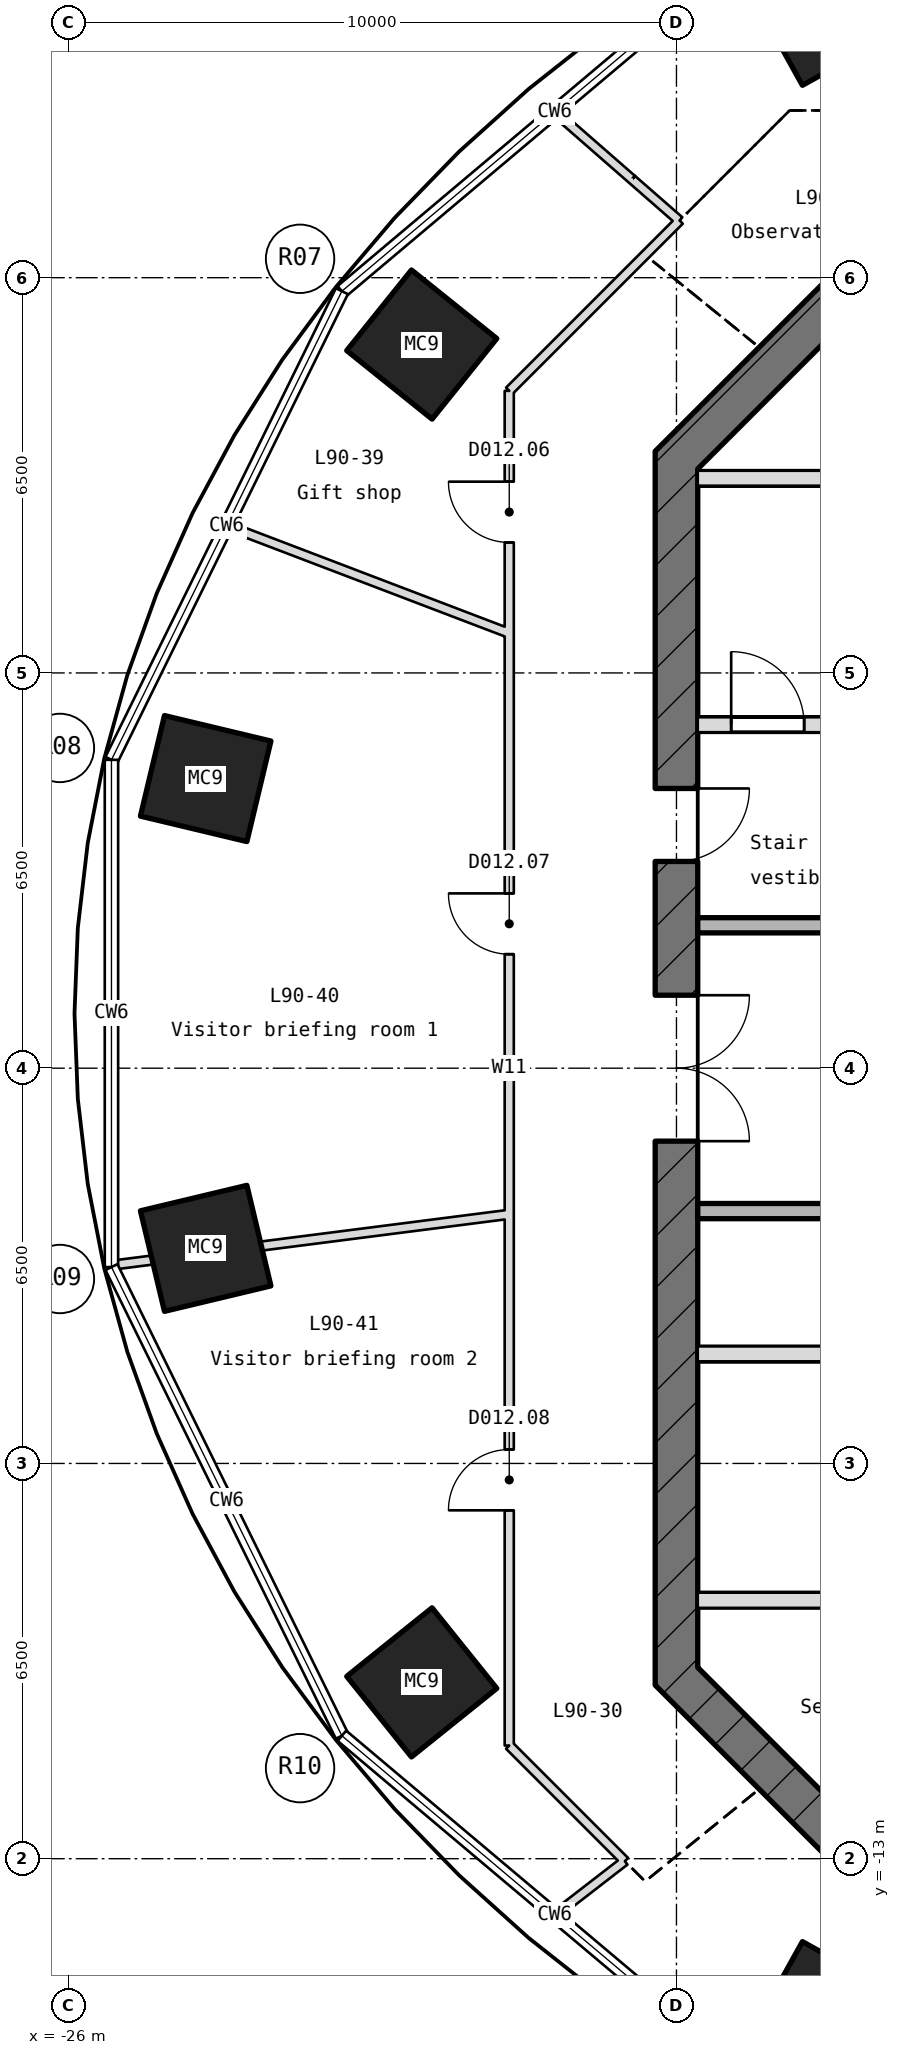
"""IFC4 building model, lengths in metres.
Left out: names, types, materials, properties, quantities, classifications, styles, units other than length and angle.
Written with IfcOpenShell. Run it as: python <this file> out.ifc"""

import sys

from ifc_helpers import new_model, si_unit, direction, frame, frame_2d, origin, origin_2d, place, context, subcontext, project, spatial, rectangle, hollow_rectangle, extrude, element, fill, save


model = new_model("IFC4")
c1 = context("Model", 3, precision=1e-05, world=origin(), true_north=direction((0.0, 1.0)))
c2 = subcontext(c1, "Body", "Model", "MODEL_VIEW")
j1 = project(units=[si_unit("LENGTHUNIT", "METRE"), si_unit("PLANEANGLEUNIT", "RADIAN")], contexts=[c1])
p1 = place(None, origin())
s1 = spatial("IfcSite", under=j1, at=p1, CompositionType="ELEMENT")
p2 = place(p1, origin())
s2 = spatial("IfcBuilding", under=s1, at=p2, CompositionType="ELEMENT")
p3 = place(p2, frame((0.0, 0.0, 396.55)))
s3 = spatial("IfcBuildingStorey", under=s2, at=p3, CompositionType="ELEMENT", Elevation=396.55)
for number, where, z_axis, x_axis in (
    (1, (-13.623, 17.363, -0.25), (0.0, 0.0, 1.0), (0.874, 0.486, 0.0)),
    (2, (-20.189, 11.9, -0.25), (0.0, 0.0, 1.0), (0.626, 0.78, 0.0)),
    (3, (-23.743, 4.763, -0.25), (0.0, 0.0, 1.0), (0.233, 0.973, 0.0)),
    (4, (-23.743, -2.963, -0.25), (0.0, 0.0, 1.0), (-0.233, 0.973, 0.0)),
    (5, (-20.189, -10.1, -0.25), (0.0, 0.0, 1.0), (-0.626, 0.78, 0.0)),
    (6, (-13.623, -15.563, -0.25), (0.0, 0.0, 1.0), (-0.874, 0.486, 0.0)),
):
    element("IfcColumn", number, at=place(p3, frame(where, z_axis=z_axis, x_axis=x_axis)), inside=s3, PredefinedType="COLUMN", context=c2, shape_type="SweptSolid", body=[
        extrude(hollow_rectangle(XDim=1.7, YDim=1.8, WallThickness=0.05, at=origin_2d()), origin(), (0.0, 0.0, 1.0), 5.4),
    ])
p4 = place(p3, frame((-12.897, 13.103, -0.25), z_axis=(0.0, 0.0, 1.0), x_axis=(-0.707106781187, -0.707106781187, 0.0)))
e7 = element("IfcWall", 7, at=p4, inside=s3, PredefinedType="SHEAR", context=c2, shape_type="SweptSolid", body=[
    extrude(rectangle(XDim=4.533, YDim=0.7, at=frame_2d((2.266, 0.0))), origin(), (0.0, 0.0, 1.0), 5.4),
])
p5 = place(p3, frame((-16.0, 10.145, -0.25), z_axis=(0.0, 0.0, 1.0), x_axis=(0.0, -1.0, 0.0)))
e8 = element("IfcWall", 8, at=p5, inside=s3, PredefinedType="SHEAR", context=c2, shape_type="SweptSolid", body=[
    extrude(rectangle(XDim=20.29, YDim=0.7, at=frame_2d((10.145, 0.0))), origin(), (0.0, 0.0, 1.0), 5.4),
])
p6 = place(p5, frame((8.945, 0.0, 0.25)))
e9 = element("IfcOpeningElement", 9, at=p6, cuts=e8, PredefinedType="OPENING", context=c2, shape_type="SweptSolid", body=[
    extrude(rectangle(XDim=2.4, YDim=2.1, at=frame_2d((1.2, 1.05))), frame((0.0, 0.36, 0.0), z_axis=(0.0, -1.0, 0.0), x_axis=(1.0, 0.0, 0.0)), (0.0, 0.0, 1.0), 0.72),
])
p7 = place(p5, frame((5.545, 0.0, 0.25)))
e10 = element("IfcOpeningElement", 10, at=p7, cuts=e8, PredefinedType="OPENING", context=c2, shape_type="SweptSolid", body=[
    extrude(rectangle(XDim=1.2, YDim=2.1, at=frame_2d((0.6, 1.05))), frame((0.0, 0.36, 0.0), z_axis=(0.0, -1.0, 0.0), x_axis=(1.0, 0.0, 0.0)), (0.0, 0.0, 1.0), 0.72),
])
p8 = place(p3, frame((-16.103, -9.897, -0.25), z_axis=(0.0, 0.0, 1.0), x_axis=(0.707106781187, -0.707106781187, 0.0)))
e11 = element("IfcWall", 11, at=p8, inside=s3, PredefinedType="SHEAR", context=c2, shape_type="SweptSolid", body=[
    extrude(rectangle(XDim=4.533, YDim=0.7, at=frame_2d((2.266, 0.0))), origin(), (0.0, 0.0, 1.0), 5.4),
])
p9 = place(p3, frame((-15.65, -8.75, -0.25), z_axis=(0.0, 0.0, 1.0), x_axis=(1.0, 0.0, 0.0)))
e12 = element("IfcWall", 12, at=p9, inside=s3, PredefinedType="SHEAR", context=c2, shape_type="SweptSolid", body=[
    extrude(rectangle(XDim=7.1, YDim=0.25, at=frame_2d((3.55, 0.0))), origin(), (0.0, 0.0, 1.0), 5.4),
])
p10 = place(p9, frame((5.6, 0.0, 0.25)))
e13 = element("IfcOpeningElement", 13, at=p10, cuts=e12, PredefinedType="OPENING", context=c2, shape_type="SweptSolid", body=[
    extrude(rectangle(XDim=1.2, YDim=2.1, at=frame_2d((0.6, 1.05))), frame((0.0, 0.135, 0.0), z_axis=(0.0, -1.0, 0.0), x_axis=(1.0, 0.0, 0.0)), (0.0, 0.0, 1.0), 0.27),
])
p11 = place(p3, frame((-15.65, -4.7, -0.25), z_axis=(0.0, 0.0, 1.0), x_axis=(1.0, 0.0, 0.0)))
e14 = element("IfcWall", 14, at=p11, inside=s3, PredefinedType="SHEAR", context=c2, shape_type="SweptSolid", body=[
    extrude(rectangle(XDim=7.1, YDim=0.25, at=frame_2d((3.55, 0.0))), origin(), (0.0, 0.0, 1.0), 5.4),
])
for number, where, z_axis, x_axis in (
    (15, (-15.65, -2.35, 0.0), (0.0, 0.0, 1.0), (1.0, 0.0, 0.0)),
    (16, (-15.65, 2.35, 0.0), (0.0, 0.0, 1.0), (1.0, 0.0, 0.0)),
):
    element("IfcWall", number, at=place(p3, frame(where, z_axis=z_axis, x_axis=x_axis)), inside=s3, PredefinedType="STANDARD", context=c2, shape_type="SweptSolid", body=[
        extrude(rectangle(XDim=7.25, YDim=0.25, at=frame_2d((3.625, 0.0))), origin(), (0.0, 0.0, 1.0), 5.15),
    ])
p12 = place(p3, frame((-15.65, 5.65, -0.25), z_axis=(0.0, 0.0, 1.0), x_axis=(1.0, 0.0, 0.0)))
e17 = element("IfcWall", 17, at=p12, inside=s3, PredefinedType="SHEAR", context=c2, shape_type="SweptSolid", body=[
    extrude(rectangle(XDim=7.1, YDim=0.25, at=frame_2d((3.55, 0.0))), origin(), (0.0, 0.0, 1.0), 5.4),
])
p13 = place(p12, frame((0.55, 0.0, 0.25)))
e18 = element("IfcOpeningElement", 18, at=p13, cuts=e17, PredefinedType="OPENING", context=c2, shape_type="SweptSolid", body=[
    extrude(rectangle(XDim=1.2, YDim=2.1, at=frame_2d((0.6, 1.05))), frame((0.0, 0.135, 0.0), z_axis=(0.0, -1.0, 0.0), x_axis=(1.0, 0.0, 0.0)), (0.0, 0.0, 1.0), 0.27),
])
p14 = place(p3, frame((-15.65, 9.7, -0.25), z_axis=(0.0, 0.0, 1.0), x_axis=(1.0, 0.0, 0.0)))
e19 = element("IfcWall", 19, at=p14, inside=s3, PredefinedType="SHEAR", context=c2, shape_type="SweptSolid", body=[
    extrude(rectangle(XDim=7.1, YDim=0.25, at=frame_2d((3.55, 0.0))), origin(), (0.0, 0.0, 1.0), 5.4),
])
p15 = place(p3, frame((-25.272, -3.238, 0.0), z_axis=(0.0, 0.0, 1.0), x_axis=(0.991889327686, 0.127104530296, 0.0)))
e20 = element("IfcWall", 20, at=p15, inside=s3, PredefinedType="PARTITIONING", context=c2, shape_type="SweptSolid", body=[
    extrude(rectangle(XDim=1.957, YDim=0.15, at=frame_2d((0.979, 0.0))), origin(), (0.0, 0.0, 1.0), 5.15),
])
p16 = place(p3, frame((-23.331, -2.99, 0.0), z_axis=(0.0, 0.0, 1.0), x_axis=(0.991891748856, 0.12708563472, 0.0)))
e21 = element("IfcWall", 21, at=p16, inside=s3, PredefinedType="PARTITIONING", context=c2, shape_type="SweptSolid", body=[
    extrude(rectangle(XDim=4.618, YDim=0.15, at=frame_2d((2.309, 0.0))), origin(), (0.0, 0.0, 1.0), 4.683),
])
p17 = place(p3, frame((-17.985, -13.915, 0.0), z_axis=(0.0, 0.0, 1.0), x_axis=(0.790899150715, 0.611946511877, 0.0)))
e22 = element("IfcWall", 22, at=p17, inside=s3, PredefinedType="PARTITIONING", context=c2, shape_type="SweptSolid", body=[
    extrude(rectangle(XDim=1.434, YDim=0.15, at=frame_2d((0.717, 0.0))), origin(), (0.0, 0.0, 1.0), 5.15),
])
p18 = place(p3, frame((-18.75, 11.139, 0.0), z_axis=(0.0, 0.0, 1.0), x_axis=(0.707106781187, 0.707106781187, 0.0)))
e23 = element("IfcWall", 23, at=p18, inside=s3, PredefinedType="PARTITIONING", context=c2, shape_type="SweptSolid", body=[
    extrude(rectangle(XDim=3.962, YDim=0.15, at=frame_2d((1.981, 0.0))), origin(), (0.0, 0.0, 1.0), 5.15),
])
p19 = place(p3, frame((-18.75, -11.139, 0.0), z_axis=(0.0, 0.0, 1.0), x_axis=(0.0, 1.0, 0.0)))
e24 = element("IfcWall", 24, at=p19, inside=s3, PredefinedType="PARTITIONING", context=c2, shape_type="SweptSolid", body=[
    extrude(rectangle(XDim=22.278, YDim=0.15, at=frame_2d((11.139, 0.0))), origin(), (0.0, 0.0, 1.0), 5.15),
])
p20 = place(p19, frame((19.785, 0.0, 0.0)))
e25 = element("IfcOpeningElement", 25, at=p20, cuts=e24, PredefinedType="OPENING", context=c2, shape_type="SweptSolid", body=[
    extrude(rectangle(XDim=1.0, YDim=2.1, at=frame_2d((0.5, 1.05))), frame((0.0, 0.085, 0.0), z_axis=(0.0, -1.0, 0.0), x_axis=(1.0, 0.0, 0.0)), (0.0, 0.0, 1.0), 0.17),
])
p21 = place(p19, frame((13.014, 0.0, 0.0)))
e26 = element("IfcOpeningElement", 26, at=p21, cuts=e24, PredefinedType="OPENING", context=c2, shape_type="SweptSolid", body=[
    extrude(rectangle(XDim=1.0, YDim=2.1, at=frame_2d((0.5, 1.05))), frame((0.0, 0.085, 0.0), z_axis=(0.0, -1.0, 0.0), x_axis=(1.0, 0.0, 0.0)), (0.0, 0.0, 1.0), 0.17),
])
p22 = place(p19, frame((3.868, 0.0, 0.0)))
e27 = element("IfcOpeningElement", 27, at=p22, cuts=e24, PredefinedType="OPENING", context=c2, shape_type="SweptSolid", body=[
    extrude(rectangle(XDim=1.0, YDim=2.1, at=frame_2d((0.5, 1.05))), frame((0.0, 0.085, 0.0), z_axis=(0.0, -1.0, 0.0), x_axis=(1.0, 0.0, 0.0)), (0.0, 0.0, 1.0), 0.17),
])
p23 = place(p3, frame((-16.848, -13.041, 0.0), z_axis=(0.0, 0.0, 1.0), x_axis=(-0.707106781187, 0.707106781187, 0.0)))
e28 = element("IfcWall", 28, at=p23, inside=s3, PredefinedType="PARTITIONING", context=c2, shape_type="SweptSolid", body=[
    extrude(rectangle(XDim=2.69, YDim=0.15, at=frame_2d((1.345, 0.0))), origin(), (0.0, 0.0, 1.0), 4.688),
])
p24 = place(p3, frame((-15.952, 13.937, 0.0), z_axis=(0.0, 0.0, 1.0), x_axis=(-0.753175860567, 0.657819217612, 0.0)))
e29 = element("IfcWall", 29, at=p24, inside=s3, PredefinedType="PARTITIONING", context=c2, shape_type="SweptSolid", body=[
    extrude(rectangle(XDim=1.034, YDim=0.15, at=frame_2d((0.517, 0.0))), origin(), (0.0, 0.0, 1.0), 4.84),
])
p25 = place(p3, frame((-16.731, 14.617, 0.0), z_axis=(0.0, 0.0, 1.0), x_axis=(-0.753048092567, 0.657965478032, 0.0)))
e30 = element("IfcWall", 30, at=p25, inside=s3, PredefinedType="PARTITIONING", context=c2, shape_type="SweptSolid", body=[
    extrude(rectangle(XDim=1.572, YDim=0.15, at=frame_2d((0.786, 0.0))), origin(), (0.0, 0.0, 1.0), 5.15),
])
p26 = place(p3, frame((-18.75, 7.152, 0.0), z_axis=(0.0, 0.0, 1.0), x_axis=(-0.934331505046, 0.356405160847, 0.0)))
e31 = element("IfcWall", 31, at=p26, inside=s3, PredefinedType="PARTITIONING", context=c2, shape_type="SweptSolid", body=[
    extrude(rectangle(XDim=4.954, YDim=0.15, at=frame_2d((2.477, 0.0))), origin(), (0.0, 0.0, 1.0), 5.15),
])
p27 = place(p13, origin())
e32 = element("IfcDoor", 32, at=p27, inside=s3, OperationType="SINGLE_SWING_RIGHT", PredefinedType="DOOR", context=c2, shape_type="SweptSolid", body=[
    extrude(rectangle(XDim=1.2, YDim=2.1, at=frame_2d((0.6, 1.05))), frame((0.0, 0.025, 0.0), z_axis=(0.0, -1.0, 0.0), x_axis=(1.0, 0.0, 0.0)), (0.0, 0.0, 1.0), 0.05),
])
fill(e18, e32)
p28 = place(p6, origin())
e33 = element("IfcDoor", 33, at=p28, inside=s3, OperationType="DOUBLE_DOOR_SINGLE_SWING", PredefinedType="DOOR", context=c2, shape_type="SweptSolid", body=[
    extrude(rectangle(XDim=2.4, YDim=2.1, at=frame_2d((1.2, 1.05))), frame((0.0, 0.025, 0.0), z_axis=(0.0, -1.0, 0.0), x_axis=(1.0, 0.0, 0.0)), (0.0, 0.0, 1.0), 0.05),
])
fill(e9, e33)
p29 = place(p7, origin())
e34 = element("IfcDoor", 34, at=p29, inside=s3, OperationType="SINGLE_SWING_RIGHT", PredefinedType="DOOR", context=c2, shape_type="SweptSolid", body=[
    extrude(rectangle(XDim=1.2, YDim=2.1, at=frame_2d((0.6, 1.05))), frame((0.0, 0.025, 0.0), z_axis=(0.0, -1.0, 0.0), x_axis=(1.0, 0.0, 0.0)), (0.0, 0.0, 1.0), 0.05),
])
fill(e10, e34)
p30 = place(p20, origin())
e35 = element("IfcDoor", 35, at=p30, inside=s3, OperationType="SINGLE_SWING_RIGHT", PredefinedType="DOOR", context=c2, shape_type="SweptSolid", body=[
    extrude(rectangle(XDim=1.0, YDim=2.1, at=frame_2d((0.5, 1.05))), frame((0.0, 0.025, 0.0), z_axis=(0.0, -1.0, 0.0), x_axis=(1.0, 0.0, 0.0)), (0.0, 0.0, 1.0), 0.05),
])
fill(e25, e35)
p31 = place(p21, origin())
e36 = element("IfcDoor", 36, at=p31, inside=s3, OperationType="SINGLE_SWING_RIGHT", PredefinedType="DOOR", context=c2, shape_type="SweptSolid", body=[
    extrude(rectangle(XDim=1.0, YDim=2.1, at=frame_2d((0.5, 1.05))), frame((0.0, 0.025, 0.0), z_axis=(0.0, -1.0, 0.0), x_axis=(1.0, 0.0, 0.0)), (0.0, 0.0, 1.0), 0.05),
])
fill(e26, e36)
p32 = place(p22, origin())
e37 = element("IfcDoor", 37, at=p32, inside=s3, OperationType="SINGLE_SWING_RIGHT", PredefinedType="DOOR", context=c2, shape_type="SweptSolid", body=[
    extrude(rectangle(XDim=1.0, YDim=2.1, at=frame_2d((0.5, 1.05))), frame((0.0, 0.025, 0.0), z_axis=(0.0, -1.0, 0.0), x_axis=(1.0, 0.0, 0.0)), (0.0, 0.0, 1.0), 0.05),
])
fill(e27, e37)
save(model, sys.argv[1])
